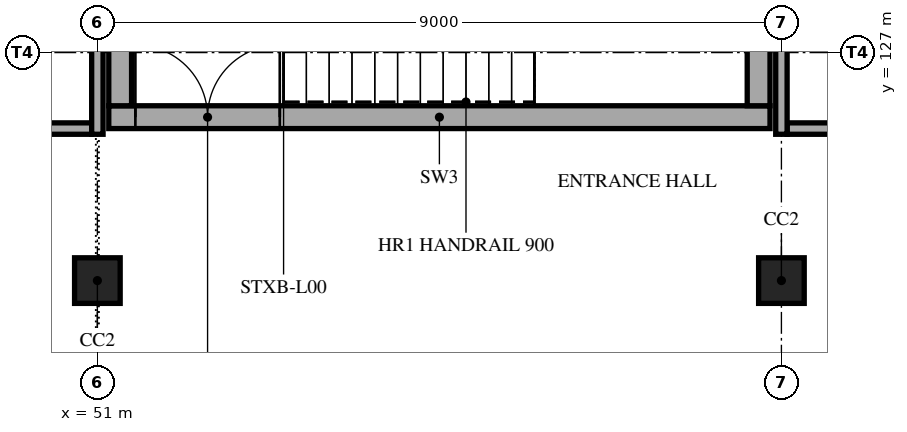
"""IFC4 building model, lengths in metres.
Left out: names, types, materials, properties, quantities, classifications, styles, units other than length and angle.
Written with IfcOpenShell. Run it as: python <this file> out.ifc"""

import sys

from ifc_helpers import new_model, si_unit, direction, frame, frame_2d, origin, origin_2d, place, context, subcontext, project, spatial, rectangle, extrude, element, fill, save


model = new_model("IFC4")
c1 = context("Model", 3, precision=1e-05, world=origin(), true_north=direction((0.0, 1.0)))
c2 = subcontext(c1, "Body", "Model", "MODEL_VIEW")
j1 = project(units=[si_unit("LENGTHUNIT", "METRE"), si_unit("PLANEANGLEUNIT", "RADIAN")], contexts=[c1])
p1 = place(None, origin())
s1 = spatial("IfcSite", under=j1, at=p1, CompositionType="ELEMENT")
p2 = place(p1, origin())
s2 = spatial("IfcBuilding", under=s1, at=p2, CompositionType="ELEMENT")
p3 = place(p2, origin())
s3 = spatial("IfcBuildingStorey", under=s2, at=p3, CompositionType="ELEMENT", Elevation=0.0)
for number, where, z_axis, x_axis in (
    (1, (51.0, 124.0, 0.0), (0.0, 0.0, 1.0), (1.0, 0.0, 0.0)),
    (2, (60.0, 124.0, 0.0), (0.0, 0.0, 1.0), (1.0, 0.0, 0.0)),
):
    element("IfcColumn", number, at=place(p3, frame(where, z_axis=z_axis, x_axis=x_axis)), inside=s3, PredefinedType="COLUMN", context=c2, shape_type="SweptSolid", body=[
        extrude(rectangle(XDim=0.6, YDim=0.6, at=origin_2d()), origin(), (0.0, 0.0, 1.0), 5.0),
    ])
p4 = place(p3, frame((51.15, 126.15, 0.0), z_axis=(0.0, 0.0, 1.0), x_axis=(1.0, 0.0, 0.0)))
e3 = element("IfcWall", 3, at=p4, inside=s3, PredefinedType="SHEAR", context=c2, shape_type="SweptSolid", body=[
    extrude(rectangle(XDim=8.7, YDim=0.3, at=frame_2d((4.35, 0.0))), origin(), (0.0, 0.0, 1.0), 5.0),
])
p5 = place(p4, frame((0.35, 0.0, 0.0)))
e4 = element("IfcOpeningElement", 4, at=p5, cuts=e3, PredefinedType="OPENING", context=c2, shape_type="SweptSolid", body=[
    extrude(rectangle(XDim=1.9, YDim=2.1, at=frame_2d((0.95, 1.05))), frame((0.0, 0.16, 0.0), z_axis=(0.0, -1.0, 0.0), x_axis=(1.0, 0.0, 0.0)), (0.0, 0.0, 1.0), 0.32),
])
for number, where, z_axis, x_axis in (
    (5, (51.3, 126.3, 0.0), (0.0, 0.0, 1.0), (0.0, 1.0, 0.0)),
    (6, (59.7, 126.3, 0.0), (0.0, 0.0, 1.0), (0.0, 1.0, 0.0)),
):
    element("IfcWall", number, at=place(p3, frame(where, z_axis=z_axis, x_axis=x_axis)), inside=s3, PredefinedType="SHEAR", context=c2, shape_type="SweptSolid", body=[
        extrude(rectangle(XDim=4.2, YDim=0.3, at=frame_2d((2.1, 0.0))), origin(), (0.0, 0.0, 1.0), 5.0),
    ])
p6 = place(p3, frame((42.075, 126.0, 0.0), z_axis=(0.0, 0.0, 1.0), x_axis=(1.0, 0.0, 0.0)))
e7 = element("IfcWall", 7, at=p6, inside=s3, PredefinedType="PARTITIONING", context=c2, shape_type="SweptSolid", body=[
    extrude(rectangle(XDim=8.85, YDim=0.15, at=frame_2d((4.425, 0.0))), origin(), (0.0, 0.0, 1.0), 4.8),
])
p7 = place(p6, frame((0.6, 0.0, 0.0)))
e8 = element("IfcOpeningElement", 8, at=p7, cuts=e7, PredefinedType="OPENING", context=c2, shape_type="SweptSolid", body=[
    extrude(rectangle(XDim=1.0, YDim=2.1, at=frame_2d((0.5, 1.05))), frame((0.0, 0.085, 0.0), z_axis=(0.0, -1.0, 0.0), x_axis=(1.0, 0.0, 0.0)), (0.0, 0.0, 1.0), 0.17),
])
p8 = place(p3, frame((51.0, 125.925, 0.0), z_axis=(0.0, 0.0, 1.0), x_axis=(0.0, 1.0, 0.0)))
e9 = element("IfcWall", 9, at=p8, inside=s3, PredefinedType="PARTITIONING", context=c2, shape_type="SweptSolid", body=[
    extrude(rectangle(XDim=6.675, YDim=0.15, at=frame_2d((3.337, 0.0))), origin(), (0.0, 0.0, 1.0), 4.0),
])
p9 = place(p3, frame((60.075, 126.0, 0.0), z_axis=(0.0, 0.0, 1.0), x_axis=(1.0, 0.0, 0.0)))
e10 = element("IfcWall", 10, at=p9, inside=s3, PredefinedType="PARTITIONING", context=c2, shape_type="SweptSolid", body=[
    extrude(rectangle(XDim=8.85, YDim=0.15, at=frame_2d((4.425, 0.0))), origin(), (0.0, 0.0, 1.0), 4.8),
])
p10 = place(p9, frame((0.6, 0.0, 0.0)))
e11 = element("IfcOpeningElement", 11, at=p10, cuts=e10, PredefinedType="OPENING", context=c2, shape_type="SweptSolid", body=[
    extrude(rectangle(XDim=1.0, YDim=2.1, at=frame_2d((0.5, 1.05))), frame((0.0, 0.085, 0.0), z_axis=(0.0, -1.0, 0.0), x_axis=(1.0, 0.0, 0.0)), (0.0, 0.0, 1.0), 0.17),
])
p11 = place(p3, frame((60.0, 125.925, 0.0), z_axis=(0.0, 0.0, 1.0), x_axis=(0.0, 1.0, 0.0)))
e12 = element("IfcWall", 12, at=p11, inside=s3, PredefinedType="PARTITIONING", context=c2, shape_type="SweptSolid", body=[
    extrude(rectangle(XDim=6.675, YDim=0.15, at=frame_2d((3.337, 0.0))), origin(), (0.0, 0.0, 1.0), 4.0),
])
p12 = place(p5, origin())
e13 = element("IfcDoor", 13, at=p12, inside=s3, OperationType="DOUBLE_DOOR_SINGLE_SWING", PredefinedType="NOTDEFINED", context=c2, shape_type="SweptSolid", body=[
    extrude(rectangle(XDim=1.9, YDim=2.1, at=frame_2d((0.95, 1.05))), frame((0.0, 0.025, 0.0), z_axis=(0.0, -1.0, 0.0), x_axis=(1.0, 0.0, 0.0)), (0.0, 0.0, 1.0), 0.05),
])
fill(e4, e13)
save(model, sys.argv[1])
